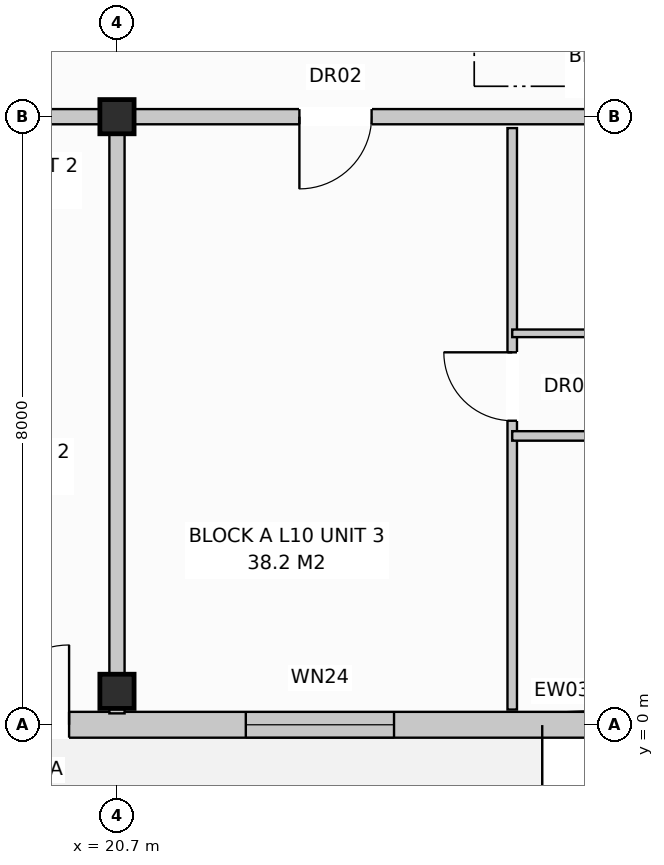
"""IFC4 building model, lengths in metres.
Left out: names, types, materials, properties, quantities, classifications, styles, units other than length and angle.
Written with IfcOpenShell. Run it as: python <this file> out.ifc"""

import sys

from ifc_helpers import new_model, si_unit, direction, frame, frame_2d, origin, origin_with_axes, origin_2d, place, context, subcontext, project, spatial, rectangle, extrude, element, fill, save


model = new_model("IFC4")
c1 = context("Model", 3, precision=1e-05, world=origin(), true_north=direction((0.0, 1.0)))
c2 = subcontext(c1, "Body", "Model", "MODEL_VIEW")
j1 = project(units=[si_unit("LENGTHUNIT", "METRE"), si_unit("PLANEANGLEUNIT", "RADIAN")], contexts=[c1])
p1 = place(None, origin())
s1 = spatial("IfcSite", under=j1, at=p1, CompositionType="ELEMENT")
p2 = place(p1, origin())
s2 = spatial("IfcBuilding", under=s1, at=p2, CompositionType="ELEMENT")
p3 = place(p2, frame((0.0, 0.0, 33.6)))
s3 = spatial("IfcBuildingStorey", under=s2, at=p3, CompositionType="ELEMENT", Elevation=33.6)
for number, where, z_axis, x_axis in (
    (1, (20.7, 0.44, 0.0), (0.0, 0.0, 1.0), (1.0, 0.0, 0.0)),
    (2, (20.7, 8.0, 0.0), (0.0, 0.0, 1.0), (1.0, 0.0, 0.0)),
):
    element("IfcColumn", number, at=place(p3, frame(where, z_axis=z_axis, x_axis=x_axis)), inside=s3, PredefinedType="COLUMN", context=c2, shape_type="SweptSolid", body=[
        extrude(rectangle(XDim=0.45, YDim=0.45, at=origin_2d()), origin(), (0.0, 0.0, 1.0), 3.2),
    ])
p4 = place(p3, frame((0.16, 0.0, 0.0), z_axis=(0.0, 0.0, 1.0), x_axis=(1.0, 0.0, 0.0)))
e3 = element("IfcWall", 3, at=p4, inside=s3, PredefinedType="STANDARD", context=c2, shape_type="SweptSolid", body=[
    extrude(rectangle(XDim=41.08, YDim=0.34, at=frame_2d((20.54, 0.0))), origin(), (0.0, 0.0, 1.0), 2.96),
])
p5 = place(p4, frame((2.465, 0.0, 0.0)))
e4 = element("IfcOpeningElement", 4, at=p5, cuts=e3, PredefinedType="OPENING", context=c2, shape_type="SweptSolid", body=[
    extrude(rectangle(XDim=1.05, YDim=2.12, at=frame_2d((0.525, 1.06))), frame((0.0, 0.182, 0.0), z_axis=(0.0, -1.0, 0.0), x_axis=(1.0, 0.0, 0.0)), (0.0, 0.0, 1.0), 0.364),
])
p6 = place(p4, frame((18.86, 0.0, 0.0)))
e5 = element("IfcOpeningElement", 5, at=p6, cuts=e3, PredefinedType="OPENING", context=c2, shape_type="SweptSolid", body=[
    extrude(rectangle(XDim=1.05, YDim=2.12, at=frame_2d((0.525, 1.06))), frame((0.0, 0.182, 0.0), z_axis=(0.0, -1.0, 0.0), x_axis=(1.0, 0.0, 0.0)), (0.0, 0.0, 1.0), 0.364),
])
p7 = place(p4, frame((32.66, 0.0, 0.0)))
e6 = element("IfcOpeningElement", 6, at=p7, cuts=e3, PredefinedType="OPENING", context=c2, shape_type="SweptSolid", body=[
    extrude(rectangle(XDim=1.05, YDim=2.12, at=frame_2d((0.525, 1.06))), frame((0.0, 0.182, 0.0), z_axis=(0.0, -1.0, 0.0), x_axis=(1.0, 0.0, 0.0)), (0.0, 0.0, 1.0), 0.364),
])
p8 = place(p4, frame((0.76, 0.0, 0.72)))
e7 = element("IfcOpeningElement", 7, at=p8, cuts=e3, PredefinedType="OPENING", context=c2, shape_type="SweptSolid", body=[
    extrude(rectangle(XDim=1.1, YDim=1.5, at=frame_2d((0.55, 0.75))), frame((0.0, 0.182, 0.0), z_axis=(0.0, -1.0, 0.0), x_axis=(1.0, 0.0, 0.0)), (0.0, 0.0, 1.0), 0.364),
])
p9 = place(p4, frame((4.26, 0.0, 0.72)))
e8 = element("IfcOpeningElement", 8, at=p9, cuts=e3, PredefinedType="OPENING", context=c2, shape_type="SweptSolid", body=[
    extrude(rectangle(XDim=1.9, YDim=1.85, at=frame_2d((0.95, 0.925))), frame((0.0, 0.182, 0.0), z_axis=(0.0, -1.0, 0.0), x_axis=(1.0, 0.0, 0.0)), (0.0, 0.0, 1.0), 0.364),
])
p10 = place(p4, frame((7.935, 0.0, 0.8)))
e9 = element("IfcOpeningElement", 9, at=p10, cuts=e3, PredefinedType="OPENING", context=c2, shape_type="SweptSolid", body=[
    extrude(rectangle(XDim=1.95, YDim=1.65, at=frame_2d((0.975, 0.825))), frame((0.0, 0.182, 0.0), z_axis=(0.0, -1.0, 0.0), x_axis=(1.0, 0.0, 0.0)), (0.0, 0.0, 1.0), 0.364),
])
p11 = place(p4, frame((11.66, 0.0, 0.72)))
e10 = element("IfcOpeningElement", 10, at=p11, cuts=e3, PredefinedType="OPENING", context=c2, shape_type="SweptSolid", body=[
    extrude(rectangle(XDim=1.1, YDim=1.5, at=frame_2d((0.55, 0.75))), frame((0.0, 0.182, 0.0), z_axis=(0.0, -1.0, 0.0), x_axis=(1.0, 0.0, 0.0)), (0.0, 0.0, 1.0), 0.364),
])
p12 = place(p4, frame((16.735, 0.0, 0.8)))
e11 = element("IfcOpeningElement", 11, at=p12, cuts=e3, PredefinedType="OPENING", context=c2, shape_type="SweptSolid", body=[
    extrude(rectangle(XDim=1.9, YDim=1.85, at=frame_2d((0.95, 0.925))), frame((0.0, 0.182, 0.0), z_axis=(0.0, -1.0, 0.0), x_axis=(1.0, 0.0, 0.0)), (0.0, 0.0, 1.0), 0.364),
])
p13 = place(p4, frame((22.235, 0.0, 0.8)))
e12 = element("IfcOpeningElement", 12, at=p13, cuts=e3, PredefinedType="OPENING", context=c2, shape_type="SweptSolid", body=[
    extrude(rectangle(XDim=1.95, YDim=1.65, at=frame_2d((0.975, 0.825))), frame((0.0, 0.182, 0.0), z_axis=(0.0, -1.0, 0.0), x_axis=(1.0, 0.0, 0.0)), (0.0, 0.0, 1.0), 0.364),
])
p14 = place(p4, frame((28.36, 0.0, 0.72)))
e13 = element("IfcOpeningElement", 13, at=p14, cuts=e3, PredefinedType="OPENING", context=c2, shape_type="SweptSolid", body=[
    extrude(rectangle(XDim=1.1, YDim=1.5, at=frame_2d((0.55, 0.75))), frame((0.0, 0.182, 0.0), z_axis=(0.0, -1.0, 0.0), x_axis=(1.0, 0.0, 0.0)), (0.0, 0.0, 1.0), 0.364),
])
p15 = place(p4, frame((30.46, 0.0, 0.8)))
e14 = element("IfcOpeningElement", 14, at=p15, cuts=e3, PredefinedType="OPENING", context=c2, shape_type="SweptSolid", body=[
    extrude(rectangle(XDim=1.9, YDim=1.85, at=frame_2d((0.95, 0.925))), frame((0.0, 0.182, 0.0), z_axis=(0.0, -1.0, 0.0), x_axis=(1.0, 0.0, 0.0)), (0.0, 0.0, 1.0), 0.364),
])
p16 = place(p4, frame((35.535, 0.0, 0.8)))
e15 = element("IfcOpeningElement", 15, at=p16, cuts=e3, PredefinedType="OPENING", context=c2, shape_type="SweptSolid", body=[
    extrude(rectangle(XDim=1.95, YDim=1.65, at=frame_2d((0.975, 0.825))), frame((0.0, 0.182, 0.0), z_axis=(0.0, -1.0, 0.0), x_axis=(1.0, 0.0, 0.0)), (0.0, 0.0, 1.0), 0.364),
])
p17 = place(p4, frame((39.26, 0.0, 0.72)))
e16 = element("IfcOpeningElement", 16, at=p17, cuts=e3, PredefinedType="OPENING", context=c2, shape_type="SweptSolid", body=[
    extrude(rectangle(XDim=1.1, YDim=1.5, at=frame_2d((0.55, 0.75))), frame((0.0, 0.182, 0.0), z_axis=(0.0, -1.0, 0.0), x_axis=(1.0, 0.0, 0.0)), (0.0, 0.0, 1.0), 0.364),
])
p18 = place(p3, frame((20.7, 7.85, 0.0), z_axis=(0.0, 0.0, 1.0), x_axis=(0.0, -1.0, 0.0)))
e17 = element("IfcWall", 17, at=p18, inside=s3, PredefinedType="PARTITIONING", context=c2, shape_type="SweptSolid", body=[
    extrude(rectangle(XDim=7.7, YDim=0.2, at=frame_2d((3.85, 0.0))), origin(), (0.0, 0.0, 1.0), 2.96),
])
p19 = place(p3, frame((6.9, 8.0, 0.0), z_axis=(0.0, 0.0, 1.0), x_axis=(1.0, 0.0, 0.0)))
e18 = element("IfcWall", 18, at=p19, inside=s3, PredefinedType="PARTITIONING", context=c2, shape_type="SweptSolid", body=[
    extrude(rectangle(XDim=13.8, YDim=0.2, at=frame_2d((6.9, 0.0))), origin(), (0.0, 0.0, 1.0), 2.4),
])
p20 = place(p19, frame((9.6, 0.0, 0.0)))
e19 = element("IfcOpeningElement", 19, at=p20, cuts=e18, PredefinedType="OPENING", context=c2, shape_type="SweptSolid", body=[
    extrude(rectangle(XDim=0.95, YDim=2.15, at=frame_2d((0.475, 1.075))), frame((0.0, 0.112, 0.0), z_axis=(0.0, -1.0, 0.0), x_axis=(1.0, 0.0, 0.0)), (0.0, 0.0, 1.0), 0.224),
])
p21 = place(p3, frame((20.7, 8.0, 0.0), z_axis=(0.0, 0.0, 1.0), x_axis=(1.0, 0.0, 0.0)))
e20 = element("IfcWall", 20, at=p21, inside=s3, PredefinedType="PARTITIONING", context=c2, shape_type="SweptSolid", body=[
    extrude(rectangle(XDim=13.8, YDim=0.2, at=frame_2d((6.9, 0.0))), origin(), (0.0, 0.0, 1.0), 2.4),
])
p22 = place(p21, frame((2.4, 0.0, 0.0)))
e21 = element("IfcOpeningElement", 21, at=p22, cuts=e20, PredefinedType="OPENING", context=c2, shape_type="SweptSolid", body=[
    extrude(rectangle(XDim=0.95, YDim=2.15, at=frame_2d((0.475, 1.075))), frame((0.0, 0.112, 0.0), z_axis=(0.0, -1.0, 0.0), x_axis=(1.0, 0.0, 0.0)), (0.0, 0.0, 1.0), 0.224),
])
p23 = place(p3, frame((25.9, 7.85, 0.0), z_axis=(0.0, 0.0, 1.0), x_axis=(0.0, -1.0, 0.0)))
e22 = element("IfcWall", 22, at=p23, inside=s3, PredefinedType="PARTITIONING", context=c2, shape_type="SweptSolid", body=[
    extrude(rectangle(XDim=7.65, YDim=0.125, at=frame_2d((3.825, 0.0))), origin(), (0.0, 0.0, 1.0), 2.59),
])
p24 = place(p23, frame((2.95, 0.0, 0.0)))
e23 = element("IfcOpeningElement", 23, at=p24, cuts=e22, PredefinedType="OPENING", context=c2, shape_type="SweptSolid", body=[
    extrude(rectangle(XDim=0.9, YDim=2.1, at=frame_2d((0.45, 1.05))), frame((0.0, 0.074, 0.0), z_axis=(0.0, -1.0, 0.0), x_axis=(1.0, 0.0, 0.0)), (0.0, 0.0, 1.0), 0.149),
])
p25 = place(p3, frame((25.9, 5.15, 0.0), z_axis=(0.0, 0.0, 1.0), x_axis=(1.0, 0.0, 0.0)))
e24 = element("IfcWall", 24, at=p25, inside=s3, PredefinedType="PARTITIONING", context=c2, shape_type="SweptSolid", body=[
    extrude(rectangle(XDim=8.5, YDim=0.1, at=frame_2d((4.25, 0.0))), origin(), (0.0, 0.0, 1.0), 2.96),
])
p26 = place(p25, frame((1.0, 0.0, 0.0)))
e25 = element("IfcOpeningElement", 25, at=p26, cuts=e24, PredefinedType="OPENING", context=c2, shape_type="SweptSolid", body=[
    extrude(rectangle(XDim=0.85, YDim=2.1, at=frame_2d((0.425, 1.05))), frame((0.0, 0.062, 0.0), z_axis=(0.0, -1.0, 0.0), x_axis=(1.0, 0.0, 0.0)), (0.0, 0.0, 1.0), 0.124),
])
p27 = place(p25, frame((3.4, 0.0, 0.0)))
e26 = element("IfcOpeningElement", 26, at=p27, cuts=e24, PredefinedType="OPENING", context=c2, shape_type="SweptSolid", body=[
    extrude(rectangle(XDim=0.85, YDim=2.05, at=frame_2d((0.425, 1.025))), frame((0.0, 0.062, 0.0), z_axis=(0.0, -1.0, 0.0), x_axis=(1.0, 0.0, 0.0)), (0.0, 0.0, 1.0), 0.124),
])
p28 = place(p25, frame((6.2, 0.0, 0.0)))
e27 = element("IfcOpeningElement", 27, at=p28, cuts=e24, PredefinedType="OPENING", context=c2, shape_type="SweptSolid", body=[
    extrude(rectangle(XDim=0.85, YDim=2.05, at=frame_2d((0.425, 1.025))), frame((0.0, 0.062, 0.0), z_axis=(0.0, -1.0, 0.0), x_axis=(1.0, 0.0, 0.0)), (0.0, 0.0, 1.0), 0.124),
])
p29 = place(p3, frame((25.9, 3.8, 0.0), z_axis=(0.0, 0.0, 1.0), x_axis=(1.0, 0.0, 0.0)))
e28 = element("IfcWall", 28, at=p29, inside=s3, PredefinedType="PARTITIONING", context=c2, shape_type="SweptSolid", body=[
    extrude(rectangle(XDim=8.5, YDim=0.125, at=frame_2d((4.25, 0.0))), origin(), (0.0, 0.0, 1.0), 2.96),
])
p30 = place(p29, frame((1.5, 0.0, 0.0)))
e29 = element("IfcOpeningElement", 29, at=p30, cuts=e28, PredefinedType="OPENING", context=c2, shape_type="SweptSolid", body=[
    extrude(rectangle(XDim=0.9, YDim=2.1, at=frame_2d((0.45, 1.05))), frame((0.0, 0.074, 0.0), z_axis=(0.0, -1.0, 0.0), x_axis=(1.0, 0.0, 0.0)), (0.0, 0.0, 1.0), 0.149),
])
p31 = place(p29, frame((5.6, 0.0, 0.0)))
e30 = element("IfcOpeningElement", 30, at=p31, cuts=e28, PredefinedType="OPENING", context=c2, shape_type="SweptSolid", body=[
    extrude(rectangle(XDim=0.9, YDim=2.1, at=frame_2d((0.45, 1.05))), frame((0.0, 0.074, 0.0), z_axis=(0.0, -1.0, 0.0), x_axis=(1.0, 0.0, 0.0)), (0.0, 0.0, 1.0), 0.149),
])
p32 = place(p6, origin_with_axes())
e31 = element("IfcDoor", 31, at=p32, inside=s3, OperationType="SINGLE_SWING_RIGHT", PredefinedType="DOOR", context=c2, shape_type="SweptSolid", body=[
    extrude(rectangle(XDim=1.05, YDim=2.12, at=frame_2d((0.525, 1.06))), frame((0.0, 0.025, 0.0), z_axis=(0.0, -1.0, 0.0), x_axis=(1.0, 0.0, 0.0)), (0.0, 0.0, 1.0), 0.05),
])
fill(e5, e31)
p33 = place(p13, origin_with_axes())
e32 = element("IfcWindow", 32, at=p33, inside=s3, PartitioningType="SINGLE_PANEL", PredefinedType="WINDOW", context=c2, shape_type="SweptSolid", body=[
    extrude(rectangle(XDim=1.95, YDim=1.65, at=frame_2d((0.975, 0.825))), frame((0.0, 0.03, 0.0), z_axis=(0.0, -1.0, 0.0), x_axis=(1.0, 0.0, 0.0)), (0.0, 0.0, 1.0), 0.06),
])
fill(e12, e32)
p34 = place(p22, frame((0.95, 0.0, 0.0), z_axis=(0.0, 0.0, 1.0), x_axis=(-1.0, 0.0, 0.0)))
e33 = element("IfcDoor", 33, at=p34, inside=s3, OperationType="SINGLE_SWING_LEFT", PredefinedType="DOOR", context=c2, shape_type="SweptSolid", body=[
    extrude(rectangle(XDim=0.95, YDim=2.15, at=frame_2d((0.475, 1.075))), frame((0.0, 0.025, 0.0), z_axis=(0.0, -1.0, 0.0), x_axis=(1.0, 0.0, 0.0)), (0.0, 0.0, 1.0), 0.05),
])
fill(e21, e33)
p35 = place(p24, frame((0.9, 0.0, 0.0), z_axis=(0.0, 0.0, 1.0), x_axis=(-1.0, 0.0, 0.0)))
e34 = element("IfcDoor", 34, at=p35, inside=s3, OperationType="SINGLE_SWING_LEFT", PredefinedType="DOOR", context=c2, shape_type="SweptSolid", body=[
    extrude(rectangle(XDim=0.9, YDim=2.1, at=frame_2d((0.45, 1.05))), frame((0.0, 0.025, 0.0), z_axis=(0.0, -1.0, 0.0), x_axis=(1.0, 0.0, 0.0)), (0.0, 0.0, 1.0), 0.05),
])
fill(e23, e34)
save(model, sys.argv[1])
